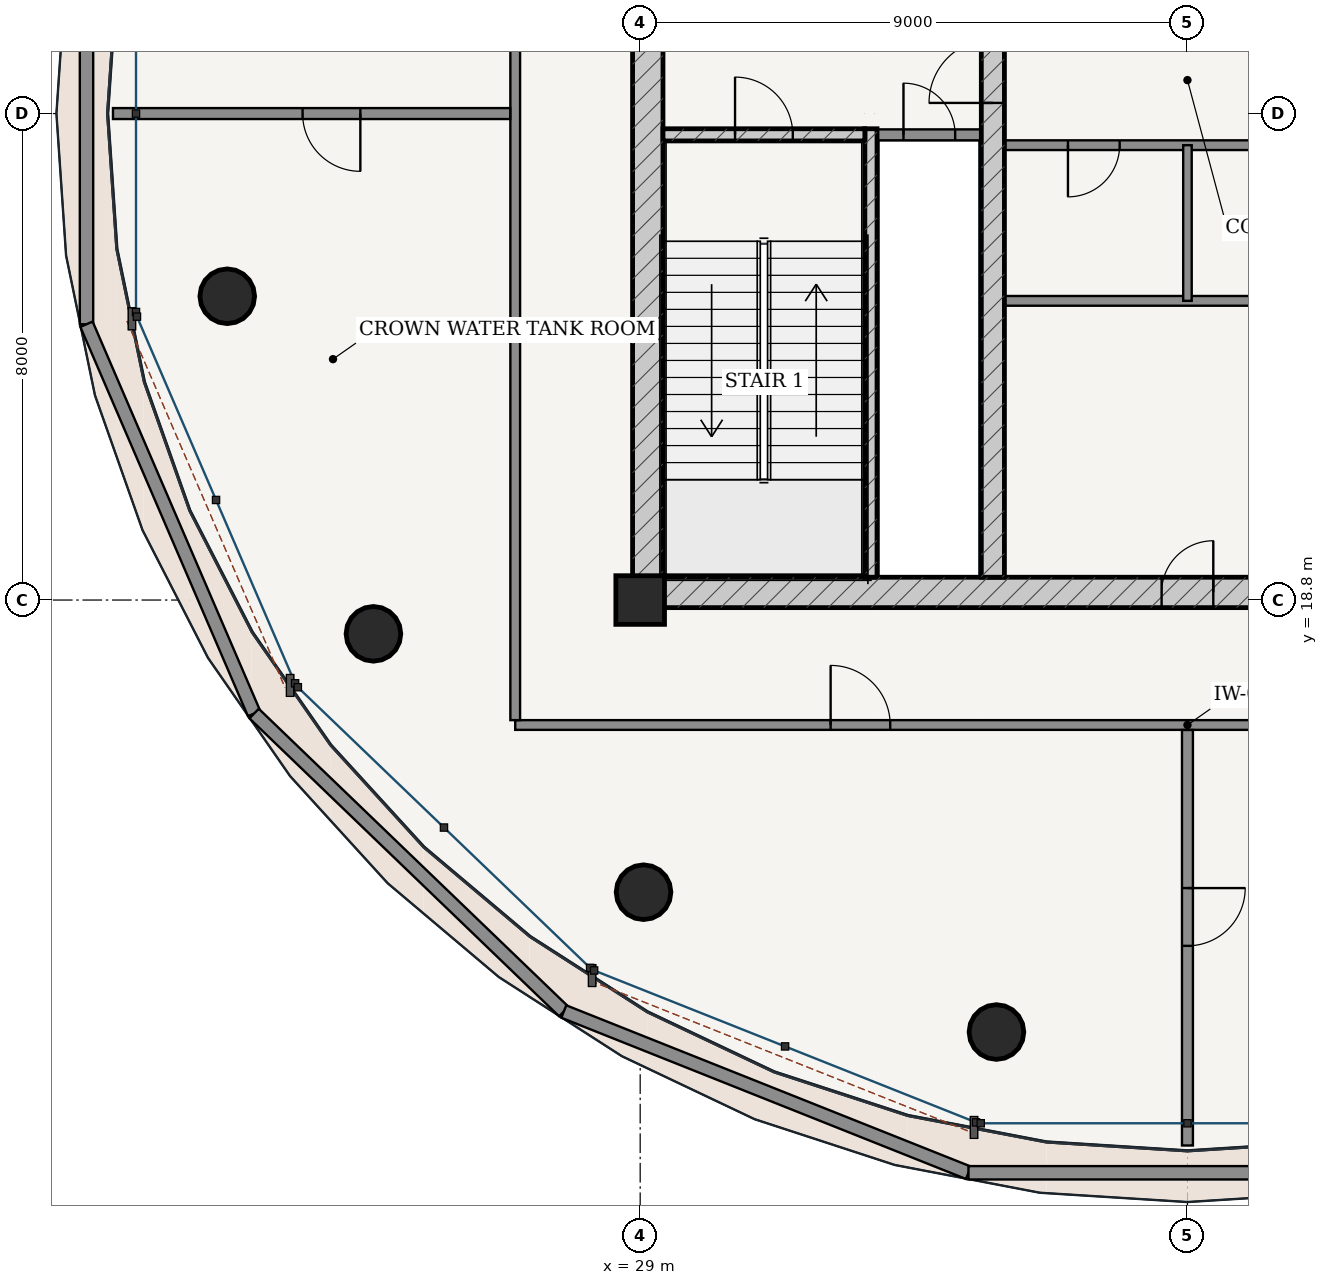
"""IFC4 building model, lengths in metres.
Left out: names, types, materials, properties, quantities, classifications, styles, units other than length and angle.
Written with IfcOpenShell. Run it as: python <this file> out.ifc"""

import sys

from ifc_helpers import new_model, si_unit, direction, frame, frame_2d, origin, origin_2d, place, context, subcontext, project, spatial, rectangle, hollow_circle, extrude, source, transform, mapped, element, fill, save


model = new_model("IFC4")
c1 = context("Model", 3, precision=1e-05, world=origin(), true_north=direction((-0.2419218956, 0.970295726276)))
c2 = subcontext(c1, "Body", "Model", "MODEL_VIEW")
j1 = project(units=[si_unit("LENGTHUNIT", "METRE"), si_unit("PLANEANGLEUNIT", "RADIAN")], contexts=[c1])
p1 = place(None, origin())
s1 = spatial("IfcSite", under=j1, at=p1, CompositionType="ELEMENT")
p2 = place(p1, origin())
s2 = spatial("IfcBuilding", under=s1, at=p2, CompositionType="ELEMENT")
p3 = place(p2, frame((0.0, 0.0, 306.1)))
s3 = spatial("IfcBuildingStorey", under=s2, at=p3, CompositionType="ELEMENT", Elevation=306.1)
p4 = place(p3, frame((29.0, 18.8, 0.0), z_axis=(0.0, 0.0, 1.0), x_axis=(1.0, 0.0, 0.0)))
e1 = element("IfcColumn", 1, at=p4, inside=s3, PredefinedType="COLUMN", context=c2, shape_type="SweptSolid", body=[
    extrude(rectangle(XDim=0.8, YDim=0.8, at=origin_2d()), origin(), (0.0, 0.0, 1.0), 5.2),
])
p5 = place(p3, frame((28.875, 18.925, 0.0), z_axis=(0.0, 0.0, 1.0), x_axis=(1.0, 0.0, 0.0)))
e2 = element("IfcWall", 2, at=p5, inside=s3, PredefinedType="SHEAR", context=c2, shape_type="SweptSolid", body=[
    extrude(rectangle(XDim=18.25, YDim=0.5, at=frame_2d((9.125, 0.0))), origin(), (0.0, 0.0, 1.0), 4.78),
])
p6 = place(p5, frame((8.7, 0.0, 0.0)))
e3 = element("IfcOpeningElement", 3, at=p6, cuts=e2, PredefinedType="OPENING", context=c2, shape_type="SweptSolid", body=[
    extrude(rectangle(XDim=0.85, YDim=2.1, at=frame_2d((0.425, 1.05))), frame((0.0, 0.26, 0.0), z_axis=(0.0, -1.0, 0.0), x_axis=(1.0, 0.0, 0.0)), (0.0, 0.0, 1.0), 0.52),
])
p7 = place(p3, frame((29.125, 19.175, 0.0), z_axis=(0.0, 0.0, 1.0), x_axis=(0.0, 1.0, 0.0)))
e4 = element("IfcWall", 4, at=p7, inside=s3, PredefinedType="SHEAR", context=c2, shape_type="SweptSolid", body=[
    extrude(rectangle(XDim=15.25, YDim=0.5, at=frame_2d((7.625, 0.0))), origin(), (0.0, 0.0, 1.0), 4.78),
])
p8 = place(p7, frame((9.875, 0.0, 0.0)))
e5 = element("IfcOpeningElement", 5, at=p8, cuts=e4, PredefinedType="OPENING", context=c2, shape_type="SweptSolid", body=[
    extrude(rectangle(XDim=1.5, YDim=2.2, at=frame_2d((0.75, 1.1))), frame((0.0, 0.26, 0.0), z_axis=(0.0, -1.0, 0.0), x_axis=(1.0, 0.0, 0.0)), (0.0, 0.0, 1.0), 0.52),
])
p9 = place(p3, frame((32.795, 19.175, 0.0), z_axis=(0.0, 0.0, 1.0), x_axis=(0.0, 1.0, 0.0)))
e6 = element("IfcWall", 6, at=p9, inside=s3, PredefinedType="SOLIDWALL", context=c2, shape_type="SweptSolid", body=[
    extrude(rectangle(XDim=7.375, YDim=0.2, at=frame_2d((3.688, 0.0))), origin(), (0.0, 0.0, 1.0), 4.78),
])
p10 = place(p3, frame((29.375, 26.45, 0.0), z_axis=(0.0, 0.0, 1.0), x_axis=(1.0, 0.0, 0.0)))
e7 = element("IfcWall", 7, at=p10, inside=s3, PredefinedType="SOLIDWALL", context=c2, shape_type="SweptSolid", body=[
    extrude(rectangle(XDim=3.32, YDim=0.2, at=frame_2d((1.66, 0.0))), origin(), (0.0, 0.0, 1.0), 4.78),
])
p11 = place(p10, frame((1.185, 0.0, 0.0)))
e8 = element("IfcOpeningElement", 8, at=p11, cuts=e7, PredefinedType="OPENING", context=c2, shape_type="SweptSolid", body=[
    extrude(rectangle(XDim=0.95, YDim=2.15, at=frame_2d((0.475, 1.075))), frame((0.0, 0.11, 0.0), z_axis=(0.0, -1.0, 0.0), x_axis=(1.0, 0.0, 0.0)), (0.0, 0.0, 1.0), 0.22),
])
p12 = place(p3, frame((34.8, 19.175, 0.0), z_axis=(0.0, 0.0, 1.0), x_axis=(0.0, 1.0, 0.0)))
e9 = element("IfcWall", 9, at=p12, inside=s3, PredefinedType="SHEAR", context=c2, shape_type="SweptSolid", body=[
    extrude(rectangle(XDim=15.25, YDim=0.38, at=frame_2d((7.625, 0.0))), origin(), (0.0, 0.0, 1.0), 4.78),
])
p13 = place(p12, frame((7.8, 0.0, 0.0)))
e10 = element("IfcOpeningElement", 10, at=p13, cuts=e9, PredefinedType="OPENING", context=c2, shape_type="SweptSolid", body=[
    extrude(rectangle(XDim=1.05, YDim=2.15, at=frame_2d((0.525, 1.075))), frame((0.0, 0.2, 0.0), z_axis=(0.0, -1.0, 0.0), x_axis=(1.0, 0.0, 0.0)), (0.0, 0.0, 1.0), 0.4),
])
for number, where, z_axis, x_axis in (
    (11, (22.209, 23.796, 0.0), (0.0, 0.0, 1.0), (1.0, 0.0, 0.0)),
    (12, (24.613, 18.244, 0.0), (0.0, 0.0, 1.0), (1.0, 0.0, 0.0)),
    (13, (29.055, 13.995, 0.0), (0.0, 0.0, 1.0), (1.0, 0.0, 0.0)),
    (14, (34.859, 11.696, 0.0), (0.0, 0.0, 1.0), (1.0, 0.0, 0.0)),
):
    element("IfcColumn", number, at=place(p3, frame(where, z_axis=z_axis, x_axis=x_axis)), inside=s3, PredefinedType="COLUMN", context=c2, shape_type="SweptSolid", body=[
        extrude(hollow_circle(Radius=0.45, WallThickness=0.032, at=origin_2d()), origin(), (0.0, 0.0, 1.0), 5.2),
    ])
p14 = place(p3, frame((19.895, 30.265, 0.0), z_axis=(0.0, 0.0, 1.0), x_axis=(0.0, -1.0, 0.0)))
e15 = element("IfcWall", 15, at=p14, inside=s3, PredefinedType="PARAPET", context=c2, shape_type="SweptSolid", body=[
    extrude(rectangle(XDim=6.93, YDim=0.22, at=frame_2d((3.465, 0.0))), origin(), (0.0, 0.0, 1.0), 1.15),
])
p15 = place(p3, frame((19.895, 23.335, 0.0), z_axis=(0.0, 0.0, 1.0), x_axis=(0.39544480712, -0.918489741109, 0.0)))
e16 = element("IfcWall", 16, at=p15, inside=s3, PredefinedType="PARAPET", context=c2, shape_type="SweptSolid", body=[
    extrude(rectangle(XDim=6.97, YDim=0.22, at=frame_2d((3.485, 0.0))), origin(), (0.0, 0.0, 1.0), 1.15),
])
p16 = place(p3, frame((22.651, 16.933, 0.0), z_axis=(0.0, 0.0, 1.0), x_axis=(0.720637211965, -0.693312345723, 0.0)))
e17 = element("IfcWall", 17, at=p16, inside=s3, PredefinedType="PARAPET", context=c2, shape_type="SweptSolid", body=[
    extrude(rectangle(XDim=7.067, YDim=0.22, at=frame_2d((3.534, 0.0))), origin(), (0.0, 0.0, 1.0), 1.15),
])
p17 = place(p3, frame((27.744, 12.033, 0.0), z_axis=(0.0, 0.0, 1.0), x_axis=(0.928955406434, -0.370191643419, 0.0)))
e18 = element("IfcWall", 18, at=p17, inside=s3, PredefinedType="PARAPET", context=c2, shape_type="SweptSolid", body=[
    extrude(rectangle(XDim=7.164, YDim=0.22, at=frame_2d((3.582, 0.0))), origin(), (0.0, 0.0, 1.0), 1.15),
])
p18 = place(p3, frame((34.399, 9.381, 0.0), z_axis=(0.0, 0.0, 1.0), x_axis=(1.0, 0.0, 0.0)))
e19 = element("IfcWall", 19, at=p18, inside=s3, PredefinedType="PARAPET", context=c2, shape_type="SweptSolid", body=[
    extrude(rectangle(XDim=7.203, YDim=0.22, at=frame_2d((3.601, 0.0))), origin(), (0.0, 0.0, 1.0), 1.15),
])
p19 = place(p3, frame((32.9, 26.45, 0.0), z_axis=(0.0, 0.0, 1.0), x_axis=(1.0, 0.0, 0.0)))
e20 = element("IfcWall", 20, at=p19, inside=s3, PredefinedType="PARTITIONING", context=c2, shape_type="SweptSolid", body=[
    extrude(rectangle(XDim=1.71, YDim=0.18, at=frame_2d((0.855, 0.0))), origin(), (0.0, 0.0, 1.0), 4.78),
])
p20 = place(p19, frame((0.43, 0.0, 0.0)))
e21 = element("IfcOpeningElement", 21, at=p20, cuts=e20, PredefinedType="OPENING", context=c2, shape_type="SweptSolid", body=[
    extrude(rectangle(XDim=0.85, YDim=2.1, at=frame_2d((0.425, 1.05))), frame((0.0, 0.1, 0.0), z_axis=(0.0, -1.0, 0.0), x_axis=(1.0, 0.0, 0.0)), (0.0, 0.0, 1.0), 0.2),
])
p21 = place(p3, frame((34.99, 26.28, 0.0), z_axis=(0.0, 0.0, 1.0), x_axis=(1.0, 0.0, 0.0)))
e22 = element("IfcWall", 22, at=p21, inside=s3, PredefinedType="PARTITIONING", context=c2, shape_type="SweptSolid", body=[
    extrude(rectangle(XDim=6.02, YDim=0.16, at=frame_2d((3.01, 0.0))), origin(), (0.0, 0.0, 1.0), 4.78),
])
p22 = place(p21, frame((1.045, 0.0, 0.0)))
e23 = element("IfcOpeningElement", 23, at=p22, cuts=e22, PredefinedType="OPENING", context=c2, shape_type="SweptSolid", body=[
    extrude(rectangle(XDim=0.85, YDim=2.1, at=frame_2d((0.425, 1.05))), frame((0.0, 0.09, 0.0), z_axis=(0.0, -1.0, 0.0), x_axis=(1.0, 0.0, 0.0)), (0.0, 0.0, 1.0), 0.18),
])
p23 = place(p21, frame((4.125, 0.0, 0.0)))
e24 = element("IfcOpeningElement", 24, at=p23, cuts=e22, PredefinedType="OPENING", context=c2, shape_type="SweptSolid", body=[
    extrude(rectangle(XDim=0.85, YDim=2.1, at=frame_2d((0.425, 1.05))), frame((0.0, 0.09, 0.0), z_axis=(0.0, -1.0, 0.0), x_axis=(1.0, 0.0, 0.0)), (0.0, 0.0, 1.0), 0.18),
])
p24 = place(p3, frame((34.99, 23.72, 0.0), z_axis=(0.0, 0.0, 1.0), x_axis=(1.0, 0.0, 0.0)))
e25 = element("IfcWall", 25, at=p24, inside=s3, PredefinedType="PARTITIONING", context=c2, shape_type="SweptSolid", body=[
    extrude(rectangle(XDim=6.02, YDim=0.16, at=frame_2d((3.01, 0.0))), origin(), (0.0, 0.0, 1.0), 4.78),
])
p25 = place(p3, frame((38.0, 23.72, 0.0), z_axis=(0.0, 0.0, 1.0), x_axis=(0.0, 1.0, 0.0)))
e26 = element("IfcWall", 26, at=p25, inside=s3, PredefinedType="PARTITIONING", context=c2, shape_type="SweptSolid", body=[
    extrude(rectangle(XDim=2.56, YDim=0.14, at=frame_2d((1.28, 0.0))), origin(), (0.0, 0.0, 1.0), 4.78),
])
p26 = place(p3, frame((26.945, 16.745, 0.0), z_axis=(0.0, 0.0, 1.0), x_axis=(1.0, 0.0, 0.0)))
e27 = element("IfcWall", 27, at=p26, inside=s3, PredefinedType="PARTITIONING", context=c2, shape_type="SweptSolid", body=[
    extrude(rectangle(XDim=22.11, YDim=0.16, at=frame_2d((11.055, 0.0))), origin(), (0.0, 0.0, 1.0), 4.352),
])
p27 = place(p26, frame((5.187, 0.0, 0.0)))
e28 = element("IfcOpeningElement", 28, at=p27, cuts=e27, PredefinedType="OPENING", context=c2, shape_type="SweptSolid", body=[
    extrude(rectangle(XDim=0.98, YDim=2.2, at=frame_2d((0.49, 1.1))), frame((0.0, 0.09, 0.0), z_axis=(0.0, -1.0, 0.0), x_axis=(1.0, 0.0, 0.0)), (0.0, 0.0, 1.0), 0.18),
])
p28 = place(p26, frame((15.943, 0.0, 0.0)))
e29 = element("IfcOpeningElement", 29, at=p28, cuts=e27, PredefinedType="OPENING", context=c2, shape_type="SweptSolid", body=[
    extrude(rectangle(XDim=0.98, YDim=2.2, at=frame_2d((0.49, 1.1))), frame((0.0, 0.09, 0.0), z_axis=(0.0, -1.0, 0.0), x_axis=(1.0, 0.0, 0.0)), (0.0, 0.0, 1.0), 0.18),
])
p29 = place(p3, frame((26.945, 16.825, 0.0), z_axis=(0.0, 0.0, 1.0), x_axis=(0.0, 1.0, 0.0)))
e30 = element("IfcWall", 30, at=p29, inside=s3, PredefinedType="PARTITIONING", context=c2, shape_type="SweptSolid", body=[
    extrude(rectangle(XDim=19.95, YDim=0.16, at=frame_2d((9.975, 0.0))), origin(), (0.0, 0.0, 1.0), 4.352),
])
p30 = place(p3, frame((26.863, 26.8, 0.0), z_axis=(0.0, 0.0, 1.0), x_axis=(-1.0, 0.0, 0.0)))
e31 = element("IfcWall", 31, at=p30, inside=s3, PredefinedType="PARTITIONING", context=c2, shape_type="SweptSolid", body=[
    extrude(rectangle(XDim=6.533, YDim=0.18, at=frame_2d((3.267, 0.0))), origin(), (0.0, 0.0, 1.0), 4.411),
])
p31 = place(p30, frame((2.465, 0.0, 0.0)))
e32 = element("IfcOpeningElement", 32, at=p31, cuts=e31, PredefinedType="OPENING", context=c2, shape_type="SweptSolid", body=[
    extrude(rectangle(XDim=0.95, YDim=2.15, at=frame_2d((0.475, 1.075))), frame((0.0, 0.1, 0.0), z_axis=(0.0, -1.0, 0.0), x_axis=(1.0, 0.0, 0.0)), (0.0, 0.0, 1.0), 0.2),
])
p32 = place(p3, frame((38.0, 16.663, 0.0), z_axis=(0.0, 0.0, 1.0), x_axis=(0.0, -1.0, 0.0)))
e33 = element("IfcWall", 33, at=p32, inside=s3, PredefinedType="PARTITIONING", context=c2, shape_type="SweptSolid", body=[
    extrude(rectangle(XDim=6.833, YDim=0.18, at=frame_2d((3.417, 0.0))), origin(), (0.0, 0.0, 1.0), 4.411),
])
p33 = place(p32, frame((2.6, 0.0, 0.0)))
e34 = element("IfcOpeningElement", 34, at=p33, cuts=e33, PredefinedType="OPENING", context=c2, shape_type="SweptSolid", body=[
    extrude(rectangle(XDim=0.95, YDim=2.15, at=frame_2d((0.475, 1.075))), frame((0.0, 0.1, 0.0), z_axis=(0.0, -1.0, 0.0), x_axis=(1.0, 0.0, 0.0)), (0.0, 0.0, 1.0), 0.2),
])
m1 = source(origin(), c2, "Body", "SweptSolid", [
    extrude(rectangle(XDim=1.05, YDim=2.15, at=frame_2d((0.525, 1.075))), frame((0.0, 0.025, 0.0), z_axis=(0.0, -1.0, 0.0), x_axis=(1.0, 0.0, 0.0)), (0.0, 0.0, 1.0), 0.05),
])
p34 = place(p13, origin())
e35 = element("IfcDoor", 35, at=p34, inside=s3, OperationType="SINGLE_SWING_LEFT", PredefinedType="DOOR", context=c2, shape_type="MappedRepresentation", body=[
    mapped(m1, transform((0.0, 0.0, 0.0), scale=1.0)),
])
fill(e10, e35)
m2 = source(origin(), c2, "Body", "SweptSolid", [
    extrude(rectangle(XDim=0.95, YDim=2.15, at=frame_2d((0.475, 1.075))), frame((0.0, 0.025, 0.0), z_axis=(0.0, -1.0, 0.0), x_axis=(1.0, 0.0, 0.0)), (0.0, 0.0, 1.0), 0.05),
])
p35 = place(p11, origin())
e36 = element("IfcDoor", 36, at=p35, inside=s3, OperationType="SINGLE_SWING_LEFT", PredefinedType="DOOR", context=c2, shape_type="MappedRepresentation", body=[
    mapped(m2, transform((0.0, 0.0, 0.0), scale=1.0)),
])
fill(e8, e36)
m3 = source(origin(), c2, "Body", "SweptSolid", [
    extrude(rectangle(XDim=0.85, YDim=2.1, at=frame_2d((0.425, 1.05))), frame((0.0, 0.025, 0.0), z_axis=(0.0, -1.0, 0.0), x_axis=(1.0, 0.0, 0.0)), (0.0, 0.0, 1.0), 0.05),
])
p36 = place(p20, origin())
e37 = element("IfcDoor", 37, at=p36, inside=s3, OperationType="SINGLE_SWING_LEFT", PredefinedType="DOOR", context=c2, shape_type="MappedRepresentation", body=[
    mapped(m3, transform((0.0, 0.0, 0.0), scale=1.0)),
])
fill(e21, e37)
p37 = place(p22, frame((0.85, 0.0, 0.0), z_axis=(0.0, 0.0, 1.0), x_axis=(-1.0, 0.0, 0.0)))
e38 = element("IfcDoor", 38, at=p37, inside=s3, OperationType="SINGLE_SWING_RIGHT", PredefinedType="DOOR", context=c2, shape_type="MappedRepresentation", body=[
    mapped(m3, transform((0.0, 0.0, 0.0), scale=1.0)),
])
fill(e23, e38)
p38 = place(p6, origin())
e39 = element("IfcDoor", 39, at=p38, inside=s3, OperationType="SINGLE_SWING_RIGHT", PredefinedType="DOOR", context=c2, shape_type="MappedRepresentation", body=[
    mapped(m3, transform((0.0, 0.0, 0.0), scale=1.0)),
])
fill(e3, e39)
m4 = source(origin(), c2, "Body", "SweptSolid", [
    extrude(rectangle(XDim=0.98, YDim=2.2, at=frame_2d((0.49, 1.1))), frame((0.0, 0.025, 0.0), z_axis=(0.0, -1.0, 0.0), x_axis=(1.0, 0.0, 0.0)), (0.0, 0.0, 1.0), 0.05),
])
p39 = place(p27, origin())
e40 = element("IfcDoor", 40, at=p39, inside=s3, OperationType="SINGLE_SWING_LEFT", PredefinedType="DOOR", context=c2, shape_type="MappedRepresentation", body=[
    mapped(m4, transform((0.0, 0.0, 0.0), scale=1.0)),
])
fill(e28, e40)
p40 = place(p31, origin())
e41 = element("IfcDoor", 41, at=p40, inside=s3, OperationType="SINGLE_SWING_LEFT", PredefinedType="DOOR", context=c2, shape_type="MappedRepresentation", body=[
    mapped(m2, transform((0.0, 0.0, 0.0), scale=1.0)),
])
fill(e32, e41)
p41 = place(p33, origin())
e42 = element("IfcDoor", 42, at=p41, inside=s3, OperationType="SINGLE_SWING_LEFT", PredefinedType="DOOR", context=c2, shape_type="MappedRepresentation", body=[
    mapped(m2, transform((0.0, 0.0, 0.0), scale=1.0)),
])
fill(e34, e42)
save(model, sys.argv[1])
